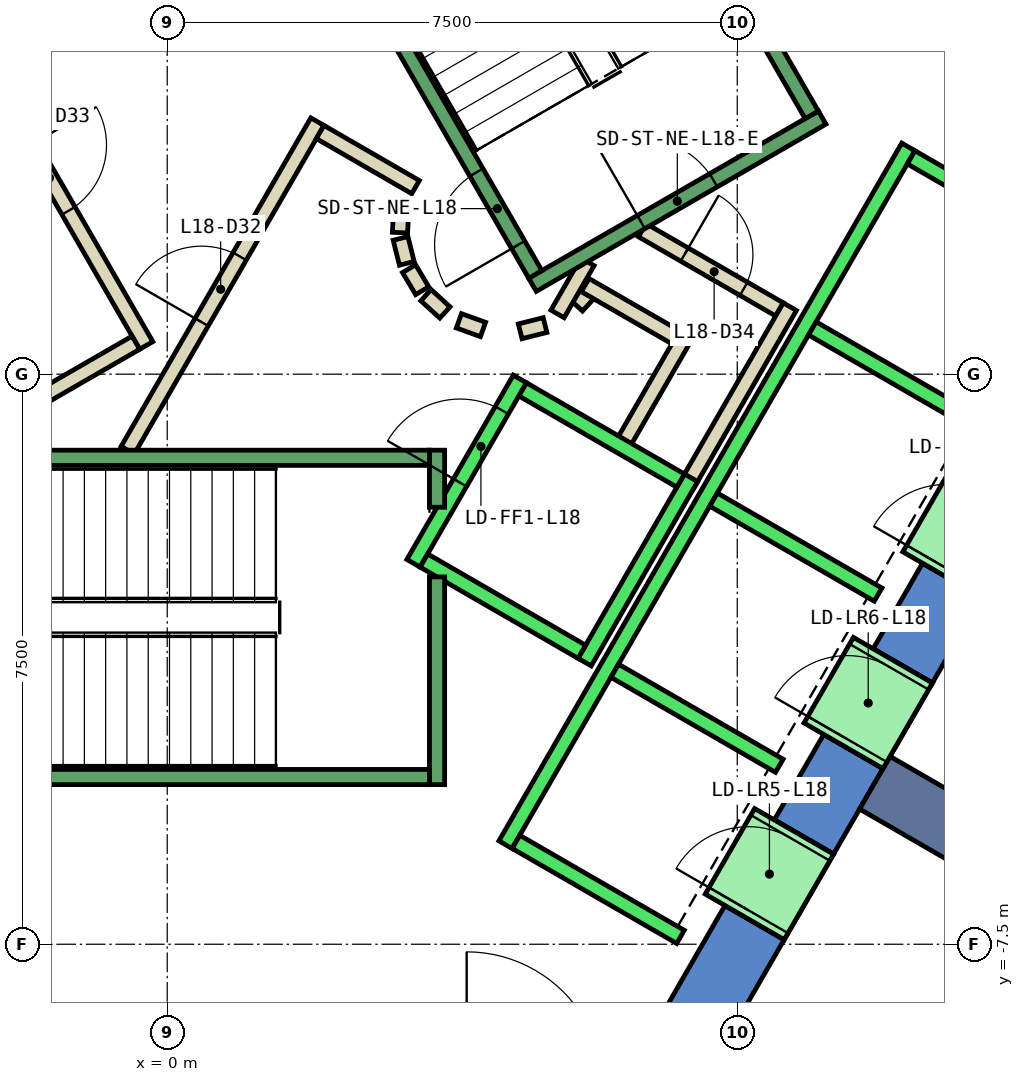
"""IFC4 building model, lengths in metres.
Left out: names, types, materials, properties, quantities, classifications, styles, units other than length and angle.
Written with IfcOpenShell. Run it as: python <this file> out.ifc"""

import sys

from ifc_helpers import new_model, si_unit, direction, frame, frame_2d, origin, place, context, subcontext, project, spatial, polyline, rectangle, outline, extrude, element, fill, save


model = new_model("IFC4")
c1 = context("Model", 3, precision=1e-05, world=origin(), true_north=direction((0.0, 1.0)))
c2 = subcontext(c1, "Body", "Model", "MODEL_VIEW")
j1 = project(units=[si_unit("LENGTHUNIT", "METRE"), si_unit("PLANEANGLEUNIT", "RADIAN")], contexts=[c1])
p1 = place(None, origin())
s1 = spatial("IfcSite", under=j1, at=p1, CompositionType="ELEMENT")
p2 = place(p1, origin())
s2 = spatial("IfcBuilding", under=s1, at=p2, CompositionType="ELEMENT")
p3 = place(p2, frame((0.0, 0.0, 86.6)))
s3 = spatial("IfcBuildingStorey", under=s2, at=p3, CompositionType="ELEMENT", Elevation=86.6)
p4 = place(p3, frame((0.0, 0.0, -0.6)))
e1 = element("IfcWall", 1, at=p4, inside=s3, PredefinedType="SHEAR", context=c2, shape_type="SweptSolid", body=[
    extrude(outline(polyline([(8.517, 11.748), (7.738, 11.298), (12.817, 2.5), (13.856, 2.5), (8.517, 11.748)])), origin(), (0.0, 0.0, 1.0), 4.4),
])
p5 = place(p3, frame((0.0, 0.0, -0.6)))
e2 = element("IfcWall", 2, at=p5, inside=s3, PredefinedType="SHEAR", context=c2, shape_type="SweptSolid", body=[
    extrude(outline(polyline([(8.117, -7.44), (7.338, -6.99), (6.409, -8.6), (6.928, -9.5), (8.117, -7.44)])), origin(), (0.0, 0.0, 1.0), 4.4),
])
p6 = place(p3, frame((0.0, 0.0, -0.6)))
e3 = element("IfcWall", 3, at=p6, inside=s3, PredefinedType="SHEAR", context=c2, shape_type="SweptSolid", body=[
    extrude(outline(polyline([(9.417, -5.189), (8.638, -4.739), (7.988, -5.864), (8.767, -6.314), (9.417, -5.189)])), origin(), (0.0, 0.0, 1.0), 4.4),
])
p7 = place(p3, frame((0.0, 0.0, -0.6)))
e4 = element("IfcWall", 4, at=p7, inside=s3, PredefinedType="SHEAR", context=c2, shape_type="SweptSolid", body=[
    extrude(outline(polyline([(10.717, -2.937), (9.938, -2.487), (9.288, -3.613), (10.067, -4.063), (10.717, -2.937)])), origin(), (0.0, 0.0, 1.0), 4.4),
])
p8 = place(p3, frame((0.0, 0.0, 3.6)))
e5 = element("IfcWall", 5, at=p8, inside=s3, PredefinedType="SHEAR", context=c2, shape_type="SweptSolid", body=[
    extrude(outline(polyline([(8.767, -6.314), (7.988, -5.864), (7.338, -6.99), (8.117, -7.44), (8.767, -6.314)])), origin(), (0.0, 0.0, 1.0), 0.2),
])
p9 = place(p3, frame((0.0, 0.0, 3.6)))
e6 = element("IfcWall", 6, at=p9, inside=s3, PredefinedType="SHEAR", context=c2, shape_type="SweptSolid", body=[
    extrude(outline(polyline([(10.067, -4.063), (9.288, -3.613), (8.638, -4.739), (9.417, -5.189), (10.067, -4.063)])), origin(), (0.0, 0.0, 1.0), 0.2),
])
p10 = place(p3, frame((0.0, 0.0, 3.6)))
e7 = element("IfcWall", 7, at=p10, inside=s3, PredefinedType="SHEAR", context=c2, shape_type="SweptSolid", body=[
    extrude(outline(polyline([(11.367, -1.811), (10.588, -1.361), (9.938, -2.487), (10.717, -2.937), (11.367, -1.811)])), origin(), (0.0, 0.0, 1.0), 0.2),
])
p11 = place(p3, frame((9.31, -5.375, -0.6), z_axis=(0.0, 0.0, 1.0), x_axis=(0.866017533419, -0.500013631625, 0.0)))
e8 = element("IfcWall", 8, at=p11, inside=s3, PredefinedType="SHEAR", context=c2, shape_type="SweptSolid", body=[
    extrude(rectangle(XDim=9.0, YDim=0.8, at=frame_2d((4.5, 0.0))), origin(), (0.0, 0.0, 1.0), 4.4),
])
p12 = place(p3, frame((5.39, 0.898, 0.0), z_axis=(0.0, 0.0, 1.0), x_axis=(0.673828488714, 0.738887791073, 0.0)))
e9 = element("IfcWall", 9, at=p12, inside=s3, PredefinedType="PARTITIONING", context=c2, shape_type="SweptSolid", body=[
    extrude(rectangle(XDim=0.263, YDim=0.2, at=frame_2d((0.131, 0.0))), origin(), (0.0, 0.0, 1.0), 3.8),
])
p13 = place(p3, frame((5.499, 1.172, 0.0), z_axis=(0.0, 0.0, 1.0), x_axis=(0.866333505267, -0.499465972466, 0.0)))
e10 = element("IfcWall", 10, at=p13, inside=s3, PredefinedType="PARTITIONING", context=c2, shape_type="SweptSolid", body=[
    extrude(rectangle(XDim=1.374, YDim=0.2, at=frame_2d((0.687, 0.0))), origin(), (0.0, 0.0, 1.0), 3.8),
])
p14 = place(p3, frame((6.826, 0.522, 0.0), z_axis=(0.0, 0.0, 1.0), x_axis=(-0.500016722714, -0.866015748706, 0.0)))
e11 = element("IfcWall", 11, at=p14, inside=s3, PredefinedType="PARTITIONING", context=c2, shape_type="SweptSolid", body=[
    extrude(rectangle(XDim=1.7, YDim=0.2, at=frame_2d((0.85, 0.0))), origin(), (0.0, 0.0, 1.0), 3.8),
])
p15 = place(p3, frame((6.25, 1.894, 0.0), z_axis=(0.0, 0.0, 1.0), x_axis=(0.866043184279, -0.499969202016, 0.0)))
e12 = element("IfcWall", 12, at=p15, inside=s3, PredefinedType="PARTITIONING", context=c2, shape_type="SweptSolid", body=[
    extrude(rectangle(XDim=2.084, YDim=0.2, at=frame_2d((1.042, 0.0))), origin(), (0.0, 0.0, 1.0), 3.8),
])
p16 = place(p15, frame((0.642, 0.0, 0.0)))
e13 = element("IfcOpeningElement", 13, at=p16, cuts=e12, PredefinedType="OPENING", context=c2, shape_type="SweptSolid", body=[
    extrude(rectangle(XDim=0.9, YDim=2.1, at=frame_2d((0.45, 1.05))), frame((0.0, 0.11, 0.0), z_axis=(0.0, -1.0, 0.0), x_axis=(1.0, 0.0, 0.0)), (0.0, 0.0, 1.0), 0.22),
])
p17 = place(p3, frame((8.192, 0.888, 0.0), z_axis=(0.0, 0.0, 1.0), x_axis=(-0.499940625693, -0.866059680843, 0.0)))
e14 = element("IfcWall", 14, at=p17, inside=s3, PredefinedType="PARTITIONING", context=c2, shape_type="SweptSolid", body=[
    extrude(rectangle(XDim=2.68, YDim=0.2, at=frame_2d((1.34, 0.0))), origin(), (0.0, 0.0, 1.0), 3.8),
])
p18 = place(p3, frame((5.135, 0.793, 0.0), z_axis=(0.0, 0.0, 1.0), x_axis=(0.499526442893, 0.866298639529, 0.0)))
e15 = element("IfcWall", 15, at=p18, inside=s3, PredefinedType="PARTITIONING", context=c2, shape_type="SweptSolid", body=[
    extrude(rectangle(XDim=0.791, YDim=0.2, at=frame_2d((0.396, 0.0))), origin(), (0.0, 0.0, 1.0), 3.8),
])
p19 = place(p3, frame((-0.52, -1.0, 0.0), z_axis=(0.0, 0.0, 1.0), x_axis=(0.50011622646, 0.865958290007, 0.0)))
e16 = element("IfcWall", 16, at=p19, inside=s3, PredefinedType="PARTITIONING", context=c2, shape_type="SweptSolid", body=[
    extrude(rectangle(XDim=4.991, YDim=0.2, at=frame_2d((2.496, 0.0))), origin(), (0.0, 0.0, 1.0), 3.8),
])
p20 = place(p19, frame((1.945, 0.0, 0.0)))
e17 = element("IfcOpeningElement", 17, at=p20, cuts=e16, PredefinedType="OPENING", context=c2, shape_type="SweptSolid", body=[
    extrude(rectangle(XDim=1.0, YDim=2.1, at=frame_2d((0.5, 1.05))), frame((0.0, 0.11, 0.0), z_axis=(0.0, -1.0, 0.0), x_axis=(1.0, 0.0, 0.0)), (0.0, 0.0, 1.0), 0.22),
])
p21 = place(p3, frame((2.012, 3.186, 0.0), z_axis=(0.0, 0.0, 1.0), x_axis=(0.865891012941, -0.500232699559, 0.0)))
e18 = element("IfcWall", 18, at=p21, inside=s3, PredefinedType="PARTITIONING", context=c2, shape_type="SweptSolid", body=[
    extrude(rectangle(XDim=1.449, YDim=0.2, at=frame_2d((0.725, 0.0))), origin(), (0.0, 0.0, 1.0), 3.8),
])
p22 = place(p3, frame((3.079, 2.199, 0.0), z_axis=(0.0, 0.0, 1.0), x_axis=(-0.047771483479, -0.998858290933, 0.0)))
e19 = element("IfcWall", 19, at=p22, inside=s3, PredefinedType="PARTITIONING", context=c2, shape_type="SweptSolid", body=[
    extrude(rectangle(XDim=0.337, YDim=0.2, at=frame_2d((0.169, 0.0))), origin(), (0.0, 0.0, 1.0), 3.8),
])
p23 = place(p3, frame((3.07, 1.786, 0.0), z_axis=(0.0, 0.0, 1.0), x_axis=(0.242705583207, -0.970099994784, 0.0)))
e20 = element("IfcWall", 20, at=p23, inside=s3, PredefinedType="PARTITIONING", context=c2, shape_type="SweptSolid", body=[
    extrude(rectangle(XDim=0.338, YDim=0.2, at=frame_2d((0.169, 0.0))), origin(), (0.0, 0.0, 1.0), 3.8),
])
for number, where, z_axis, x_axis in (
    (21, (3.182, 1.388, 0.0), (0.0, 0.0, 1.0), (0.512, -0.859, 0.0)),
    (22, (3.404, 1.039, 0.0), (0.0, 0.0, 1.0), (0.74, -0.672, 0.0)),
):
    element("IfcWall", number, at=place(p3, frame(where, z_axis=z_axis, x_axis=x_axis)), inside=s3, PredefinedType="PARTITIONING", context=c2, shape_type="SweptSolid", body=[
        extrude(rectangle(XDim=0.338, YDim=0.2, at=frame_2d((0.169, 0.0))), origin(), (0.0, 0.0, 1.0), 3.8),
    ])
p24 = place(p3, frame((3.838, 0.702, 0.0), z_axis=(0.0, 0.0, 1.0), x_axis=(0.941035081519, -0.338308993895, 0.0)))
e23 = element("IfcWall", 23, at=p24, inside=s3, PredefinedType="PARTITIONING", context=c2, shape_type="SweptSolid", body=[
    extrude(rectangle(XDim=0.337, YDim=0.2, at=frame_2d((0.168, 0.0))), origin(), (0.0, 0.0, 1.0), 3.8),
])
p25 = place(p3, frame((4.644, 0.564, 0.0), z_axis=(0.0, 0.0, 1.0), x_axis=(0.969929076366, 0.243387729394, 0.0)))
e24 = element("IfcWall", 24, at=p25, inside=s3, PredefinedType="PARTITIONING", context=c2, shape_type="SweptSolid", body=[
    extrude(rectangle(XDim=0.337, YDim=0.2, at=frame_2d((0.168, 0.0))), origin(), (0.0, 0.0, 1.0), 3.8),
])
p26 = place(p3, frame((-2.771, 4.7, 0.0), z_axis=(0.0, 0.0, 1.0), x_axis=(0.499969479948, -0.866043023828, 0.0)))
e25 = element("IfcWall", 25, at=p26, inside=s3, PredefinedType="PARTITIONING", context=c2, shape_type="SweptSolid", body=[
    extrude(rectangle(XDim=4.99, YDim=0.2, at=frame_2d((2.495, 0.0))), origin(), (0.0, 0.0, 1.0), 3.8),
])
p27 = place(p26, frame((1.945, 0.0, 0.0)))
e26 = element("IfcOpeningElement", 26, at=p27, cuts=e25, PredefinedType="OPENING", context=c2, shape_type="SweptSolid", body=[
    extrude(rectangle(XDim=1.0, YDim=2.1, at=frame_2d((0.5, 1.05))), frame((0.0, 0.11, 0.0), z_axis=(0.0, -1.0, 0.0), x_axis=(1.0, 0.0, 0.0)), (0.0, 0.0, 1.0), 0.22),
])
p28 = place(p3, frame((-0.412, 0.414, 0.0), z_axis=(0.0, 0.0, 1.0), x_axis=(-0.866017369001, -0.500013916395, 0.0)))
e27 = element("IfcWall", 27, at=p28, inside=s3, PredefinedType="PARTITIONING", context=c2, shape_type="SweptSolid", body=[
    extrude(rectangle(XDim=1.45, YDim=0.2, at=frame_2d((0.725, 0.0))), origin(), (0.0, 0.0, 1.0), 3.8),
])
p29 = place(p3, frame((12.401, -7.621, 0.0), z_axis=(0.0, 0.0, 1.0), x_axis=(-0.499983724212, -0.866034800411, 0.0)))
e28 = element("IfcWall", 28, at=p29, inside=s3, PredefinedType="PARTITIONING", context=c2, shape_type="SweptSolid", body=[
    extrude(rectangle(XDim=9.302, YDim=0.2, at=frame_2d((4.651, 0.0))), origin(), (0.0, 0.0, 1.0), 3.8),
])
p30 = place(p3, frame((3.24, -2.488, 0.0), z_axis=(0.0, 0.0, 1.0), x_axis=(0.49994636267, 0.866056369097, 0.0)))
e29 = element("IfcWall", 29, at=p30, inside=s3, PredefinedType="STANDARD", context=c2, shape_type="SweptSolid", body=[
    extrude(rectangle(XDim=2.8, YDim=0.2, at=frame_2d((1.4, 0.0))), origin(), (0.0, 0.0, 1.0), 3.8),
])
p31 = place(p30, frame((1.225, 0.0, 0.0)))
e30 = element("IfcOpeningElement", 30, at=p31, cuts=e29, PredefinedType="OPENING", context=c2, shape_type="SweptSolid", body=[
    extrude(rectangle(XDim=1.1, YDim=2.1, at=frame_2d((0.55, 1.05))), frame((0.0, 0.11, 0.0), z_axis=(0.0, -1.0, 0.0), x_axis=(1.0, 0.0, 0.0)), (0.0, 0.0, 1.0), 0.22),
])
p32 = place(p3, frame((5.492, -3.788, 0.0), z_axis=(0.0, 0.0, 1.0), x_axis=(0.500011755427, 0.866018616679, 0.0)))
e31 = element("IfcWall", 31, at=p32, inside=s3, PredefinedType="STANDARD", context=c2, shape_type="SweptSolid", body=[
    extrude(rectangle(XDim=2.8, YDim=0.2, at=frame_2d((1.4, 0.0))), origin(), (0.0, 0.0, 1.0), 3.8),
])
p33 = place(p3, frame((3.377, -2.452, 0.0), z_axis=(0.0, 0.0, 1.0), x_axis=(0.865955154139, -0.50012165622, 0.0)))
e32 = element("IfcWall", 32, at=p33, inside=s3, PredefinedType="STANDARD", context=c2, shape_type="SweptSolid", body=[
    extrude(rectangle(XDim=2.4, YDim=0.2, at=frame_2d((1.2, 0.0))), origin(), (0.0, 0.0, 1.0), 3.8),
])
p34 = place(p3, frame((4.677, -0.2, 0.0), z_axis=(0.0, 0.0, 1.0), x_axis=(0.865973769406, -0.500089422704, 0.0)))
e33 = element("IfcWall", 33, at=p34, inside=s3, PredefinedType="STANDARD", context=c2, shape_type="SweptSolid", body=[
    extrude(rectangle(XDim=2.399, YDim=0.2, at=frame_2d((1.2, 0.0))), origin(), (0.0, 0.0, 1.0), 3.8),
])
p35 = place(p3, frame((4.451, -6.19, 0.0), z_axis=(0.0, 0.0, 1.0), x_axis=(0.50000090737, 0.866024879913, 0.0)))
e34 = element("IfcWall", 34, at=p35, inside=s3, PredefinedType="STANDARD", context=c2, shape_type="SweptSolid", body=[
    extrude(rectangle(XDim=10.6, YDim=0.2, at=frame_2d((5.3, 0.0))), origin(), (0.0, 0.0, 1.0), 3.8),
])
for number, where, z_axis, x_axis in (
    (35, (4.588, -6.153, 0.0), (0.0, 0.0, 1.0), (0.866, -0.5, 0.0)),
    (36, (5.888, -3.902, 0.0), (0.0, 0.0, 1.0), (0.866, -0.5, 0.0)),
    (37, (7.188, -1.65, 0.0), (0.0, 0.0, 1.0), (0.866, -0.5, 0.0)),
    (38, (8.488, 0.602, 0.0), (0.0, 0.0, 1.0), (0.866, -0.5, 0.0)),
):
    element("IfcWall", number, at=place(p3, frame(where, z_axis=z_axis, x_axis=x_axis)), inside=s3, PredefinedType="STANDARD", context=c2, shape_type="SweptSolid", body=[
        extrude(rectangle(XDim=2.5, YDim=0.2, at=frame_2d((1.25, 0.0))), origin(), (0.0, 0.0, 1.0), 3.8),
    ])
p36 = place(p3, frame((9.788, 2.853, 0.0), z_axis=(0.0, 0.0, 1.0), x_axis=(0.865998541277, -0.500046524342, 0.0)))
e39 = element("IfcWall", 39, at=p36, inside=s3, PredefinedType="STANDARD", context=c2, shape_type="SweptSolid", body=[
    extrude(rectangle(XDim=2.5, YDim=0.2, at=frame_2d((1.25, 0.0))), origin(), (0.0, 0.0, 1.0), 3.8),
])
p37 = place(p3, frame((7.598, -7.14, 0.0), z_axis=(0.0, 0.0, 1.0), x_axis=(0.500362116554, 0.865816234728, 0.0)))
e40 = element("IfcWall", 40, at=p37, inside=s3, PredefinedType="STANDARD", context=c2, shape_type="SweptSolid", body=[
    extrude(rectangle(XDim=1.299, YDim=1.2, at=frame_2d((0.65, 0.0))), origin(), (0.0, 0.0, 1.0), 2.4),
])
p38 = place(p37, frame((0.1, 0.0, 0.0)))
e41 = element("IfcOpeningElement", 41, at=p38, cuts=e40, PredefinedType="OPENING", context=c2, shape_type="SweptSolid", body=[
    extrude(rectangle(XDim=1.1, YDim=2.3, at=frame_2d((0.55, 1.15))), frame((0.0, 0.61, 0.0), z_axis=(0.0, -1.0, 0.0), x_axis=(1.0, 0.0, 0.0)), (0.0, 0.0, 1.0), 1.22),
])
p39 = place(p3, frame((8.898, -4.889, 0.0), z_axis=(0.0, 0.0, 1.0), x_axis=(0.500036693733, 0.866004217611, 0.0)))
e42 = element("IfcWall", 42, at=p39, inside=s3, PredefinedType="STANDARD", context=c2, shape_type="SweptSolid", body=[
    extrude(rectangle(XDim=1.3, YDim=1.2, at=frame_2d((0.65, 0.0))), origin(), (0.0, 0.0, 1.0), 2.4),
])
p40 = place(p39, frame((0.1, 0.0, 0.0)))
e43 = element("IfcOpeningElement", 43, at=p40, cuts=e42, PredefinedType="OPENING", context=c2, shape_type="SweptSolid", body=[
    extrude(rectangle(XDim=1.1, YDim=2.3, at=frame_2d((0.55, 1.15))), frame((0.0, 0.61, 0.0), z_axis=(0.0, -1.0, 0.0), x_axis=(1.0, 0.0, 0.0)), (0.0, 0.0, 1.0), 1.22),
])
p41 = place(p3, frame((10.198, -2.637, 0.0), z_axis=(0.0, 0.0, 1.0), x_axis=(0.49989585183, 0.866085525409, 0.0)))
e44 = element("IfcWall", 44, at=p41, inside=s3, PredefinedType="STANDARD", context=c2, shape_type="SweptSolid", body=[
    extrude(rectangle(XDim=1.3, YDim=1.2, at=frame_2d((0.65, 0.0))), origin(), (0.0, 0.0, 1.0), 2.4),
])
p42 = place(p41, frame((0.1, 0.0, 0.0)))
e45 = element("IfcOpeningElement", 45, at=p42, cuts=e44, PredefinedType="OPENING", context=c2, shape_type="SweptSolid", body=[
    extrude(rectangle(XDim=1.1, YDim=2.3, at=frame_2d((0.55, 1.15))), frame((0.0, 0.61, 0.0), z_axis=(0.0, -1.0, 0.0), x_axis=(1.0, 0.0, 0.0)), (0.0, 0.0, 1.0), 1.22),
])
p43 = place(p3, frame((3.55, -2.667, 0.0), z_axis=(0.0, 0.0, 1.0), x_axis=(0.0, -1.0, 0.0)))
e46 = element("IfcWall", 46, at=p43, inside=s3, PredefinedType="STANDARD", context=c2, shape_type="SweptSolid", body=[
    extrude(rectangle(XDim=2.733, YDim=0.2, at=frame_2d((1.366, 0.0))), origin(), (0.0, 0.0, 1.0), 3.8),
])
p44 = place(p3, frame((3.55, -1.0, 0.0), z_axis=(0.0, 0.0, 1.0), x_axis=(0.0, -1.0, 0.0)))
e47 = element("IfcWall", 47, at=p44, inside=s3, PredefinedType="STANDARD", context=c2, shape_type="SweptSolid", body=[
    extrude(rectangle(XDim=0.751, YDim=0.2, at=frame_2d((0.375, 0.0))), origin(), (0.0, 0.0, 1.0), 3.8),
])
p45 = place(p3, frame((-3.45, -1.1, 0.0), z_axis=(0.0, 0.0, 1.0), x_axis=(1.0, 0.0, 0.0)))
e48 = element("IfcWall", 48, at=p45, inside=s3, PredefinedType="STANDARD", context=c2, shape_type="SweptSolid", body=[
    extrude(rectangle(XDim=6.9, YDim=0.2, at=frame_2d((3.45, 0.0))), origin(), (0.0, 0.0, 1.0), 3.8),
])
p46 = place(p45, frame((0.45, 0.0, 0.0)))
e49 = element("IfcOpeningElement", 49, at=p46, cuts=e48, PredefinedType="OPENING", context=c2, shape_type="SweptSolid", body=[
    extrude(rectangle(XDim=1.1, YDim=2.2, at=frame_2d((0.55, 1.1))), frame((0.0, 0.11, 0.0), z_axis=(0.0, -1.0, 0.0), x_axis=(1.0, 0.0, 0.0)), (0.0, 0.0, 1.0), 0.22),
])
p47 = place(p3, frame((-3.45, -5.3, 0.0), z_axis=(0.0, 0.0, 1.0), x_axis=(1.0, 0.0, 0.0)))
e50 = element("IfcWall", 50, at=p47, inside=s3, PredefinedType="STANDARD", context=c2, shape_type="SweptSolid", body=[
    extrude(rectangle(XDim=6.9, YDim=0.2, at=frame_2d((3.45, 0.0))), origin(), (0.0, 0.0, 1.0), 3.8),
])
p48 = place(p3, frame((4.806, 1.176, 0.0), z_axis=(0.0, 0.0, 1.0), x_axis=(0.866059941101, 0.499940174841, 0.0)))
e51 = element("IfcWall", 51, at=p48, inside=s3, PredefinedType="STANDARD", context=c2, shape_type="SweptSolid", body=[
    extrude(rectangle(XDim=4.4, YDim=0.2, at=frame_2d((2.2, 0.0))), origin(), (0.0, 0.0, 1.0), 3.8),
])
p49 = place(p48, frame((1.65, 0.0, 0.0)))
e52 = element("IfcOpeningElement", 52, at=p49, cuts=e51, PredefinedType="OPENING", context=c2, shape_type="SweptSolid", body=[
    extrude(rectangle(XDim=1.1, YDim=2.2, at=frame_2d((0.55, 1.1))), frame((0.0, 0.11, 0.0), z_axis=(0.0, -1.0, 0.0), x_axis=(1.0, 0.0, 0.0)), (0.0, 0.0, 1.0), 0.22),
])
p50 = place(p3, frame((4.843, 1.312, 0.0), z_axis=(0.0, 0.0, 1.0), x_axis=(-0.499963383562, 0.866046543262, 0.0)))
e53 = element("IfcWall", 53, at=p50, inside=s3, PredefinedType="STANDARD", context=c2, shape_type="SweptSolid", body=[
    extrude(rectangle(XDim=6.9, YDim=0.2, at=frame_2d((3.45, 0.0))), origin(), (0.0, 0.0, 1.0), 3.8),
])
p51 = place(p50, frame((0.45, 0.0, 0.0)))
e54 = element("IfcOpeningElement", 54, at=p51, cuts=e53, PredefinedType="OPENING", context=c2, shape_type="SweptSolid", body=[
    extrude(rectangle(XDim=1.1, YDim=2.2, at=frame_2d((0.55, 1.1))), frame((0.0, 0.11, 0.0), z_axis=(0.0, -1.0, 0.0), x_axis=(1.0, 0.0, 0.0)), (0.0, 0.0, 1.0), 0.22),
])
p52 = place(p3, frame((8.48, 3.412, 0.0), z_axis=(0.0, 0.0, 1.0), x_axis=(-0.499978703459, 0.866037698999, 0.0)))
e55 = element("IfcWall", 55, at=p52, inside=s3, PredefinedType="STANDARD", context=c2, shape_type="SweptSolid", body=[
    extrude(rectangle(XDim=6.9, YDim=0.2, at=frame_2d((3.45, 0.0))), origin(), (0.0, 0.0, 1.0), 3.8),
])
p53 = place(p3, frame((-1.393, 7.288, 0.0), z_axis=(0.0, 0.0, 1.0), x_axis=(-0.499963383562, -0.866046543262, 0.0)))
e56 = element("IfcWall", 56, at=p53, inside=s3, PredefinedType="STANDARD", context=c2, shape_type="SweptSolid", body=[
    extrude(rectangle(XDim=6.9, YDim=0.2, at=frame_2d((3.45, 0.0))), origin(), (0.0, 0.0, 1.0), 3.8),
])
p54 = place(p53, frame((0.45, 0.0, 0.0)))
e57 = element("IfcOpeningElement", 57, at=p54, cuts=e56, PredefinedType="OPENING", context=c2, shape_type="SweptSolid", body=[
    extrude(rectangle(XDim=1.1, YDim=2.2, at=frame_2d((0.55, 1.1))), frame((0.0, 0.11, 0.0), z_axis=(0.0, -1.0, 0.0), x_axis=(1.0, 0.0, 0.0)), (0.0, 0.0, 1.0), 0.22),
])
p55 = place(p20, origin())
e58 = element("IfcDoor", 58, at=p55, inside=s3, OperationType="SINGLE_SWING_LEFT", PredefinedType="DOOR", context=c2, shape_type="SweptSolid", body=[
    extrude(rectangle(XDim=1.0, YDim=2.1, at=frame_2d((0.5, 1.05))), frame((0.0, 0.025, 0.0), z_axis=(0.0, -1.0, 0.0), x_axis=(1.0, 0.0, 0.0)), (0.0, 0.0, 1.0), 0.05),
])
fill(e17, e58)
p56 = place(p27, origin())
e59 = element("IfcDoor", 59, at=p56, inside=s3, OperationType="SINGLE_SWING_RIGHT", PredefinedType="DOOR", context=c2, shape_type="SweptSolid", body=[
    extrude(rectangle(XDim=1.0, YDim=2.1, at=frame_2d((0.5, 1.05))), frame((0.0, 0.025, 0.0), z_axis=(0.0, -1.0, 0.0), x_axis=(1.0, 0.0, 0.0)), (0.0, 0.0, 1.0), 0.05),
])
fill(e26, e59)
p57 = place(p16, origin())
e60 = element("IfcDoor", 60, at=p57, inside=s3, OperationType="SINGLE_SWING_LEFT", PredefinedType="DOOR", context=c2, shape_type="SweptSolid", body=[
    extrude(rectangle(XDim=0.9, YDim=2.1, at=frame_2d((0.45, 1.05))), frame((0.0, 0.025, 0.0), z_axis=(0.0, -1.0, 0.0), x_axis=(1.0, 0.0, 0.0)), (0.0, 0.0, 1.0), 0.05),
])
fill(e13, e60)
p58 = place(p38, origin())
e61 = element("IfcDoor", 61, at=p58, inside=s3, OperationType="SLIDING_TO_LEFT", PredefinedType="DOOR", context=c2, shape_type="SweptSolid", body=[
    extrude(rectangle(XDim=1.1, YDim=2.3, at=frame_2d((0.55, 1.15))), frame((0.0, 0.025, 0.0), z_axis=(0.0, -1.0, 0.0), x_axis=(1.0, 0.0, 0.0)), (0.0, 0.0, 1.0), 0.05),
])
fill(e41, e61)
p59 = place(p40, origin())
e62 = element("IfcDoor", 62, at=p59, inside=s3, OperationType="SLIDING_TO_LEFT", PredefinedType="DOOR", context=c2, shape_type="SweptSolid", body=[
    extrude(rectangle(XDim=1.1, YDim=2.3, at=frame_2d((0.55, 1.15))), frame((0.0, 0.025, 0.0), z_axis=(0.0, -1.0, 0.0), x_axis=(1.0, 0.0, 0.0)), (0.0, 0.0, 1.0), 0.05),
])
fill(e43, e62)
p60 = place(p31, origin())
e63 = element("IfcDoor", 63, at=p60, inside=s3, OperationType="SLIDING_TO_LEFT", PredefinedType="DOOR", context=c2, shape_type="SweptSolid", body=[
    extrude(rectangle(XDim=1.1, YDim=2.1, at=frame_2d((0.55, 1.05))), frame((0.0, 0.025, 0.0), z_axis=(0.0, -1.0, 0.0), x_axis=(1.0, 0.0, 0.0)), (0.0, 0.0, 1.0), 0.05),
])
fill(e30, e63)
p61 = place(p51, origin())
e64 = element("IfcDoor", 64, at=p61, inside=s3, OperationType="SINGLE_SWING_LEFT", PredefinedType="DOOR", context=c2, shape_type="SweptSolid", body=[
    extrude(rectangle(XDim=1.1, YDim=2.2, at=frame_2d((0.55, 1.1))), frame((0.0, 0.025, 0.0), z_axis=(0.0, -1.0, 0.0), x_axis=(1.0, 0.0, 0.0)), (0.0, 0.0, 1.0), 0.05),
])
fill(e54, e64)
p62 = place(p49, origin())
e65 = element("IfcDoor", 65, at=p62, inside=s3, OperationType="SINGLE_SWING_LEFT", PredefinedType="DOOR", context=c2, shape_type="SweptSolid", body=[
    extrude(rectangle(XDim=1.1, YDim=2.2, at=frame_2d((0.55, 1.1))), frame((0.0, 0.025, 0.0), z_axis=(0.0, -1.0, 0.0), x_axis=(1.0, 0.0, 0.0)), (0.0, 0.0, 1.0), 0.05),
])
fill(e52, e65)
save(model, sys.argv[1])
